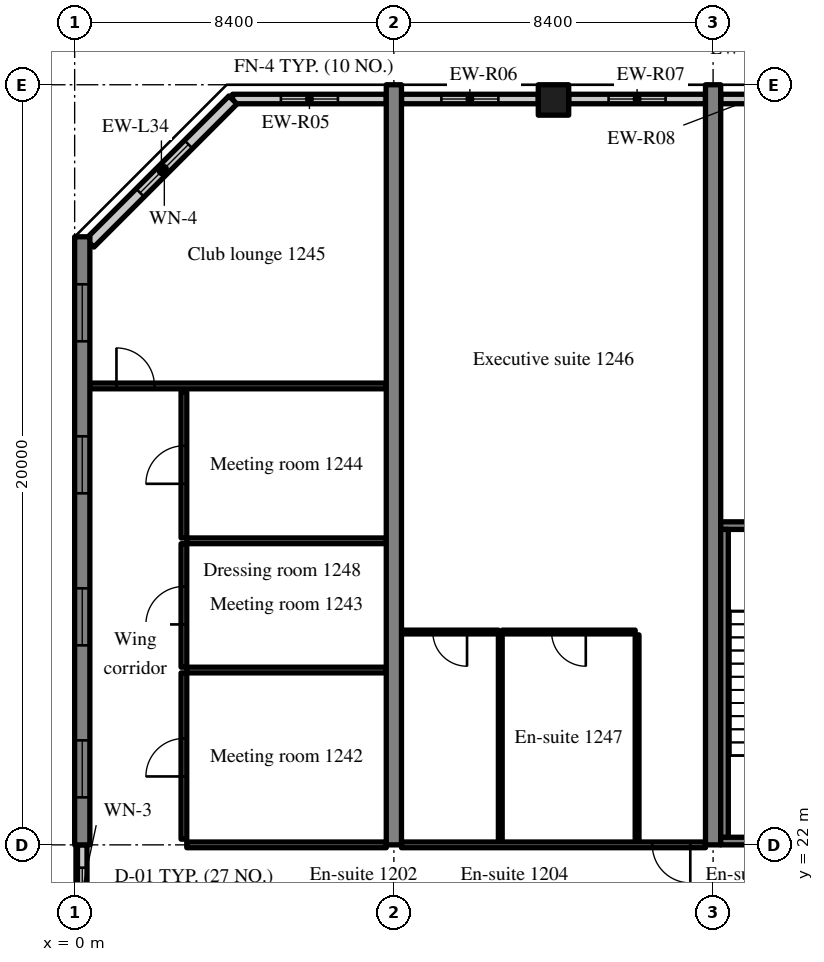
"""IFC4 building model, lengths in metres.
Left out: names, types, materials, properties, quantities, classifications, styles, units other than length and angle.
Written with IfcOpenShell. Run it as: python <this file> out.ifc"""

import sys

from ifc_helpers import new_model, si_unit, direction, frame, frame_2d, origin, origin_2d, place, context, subcontext, project, spatial, rectangle, extrude, source, transform, mapped, element, fill, save


model = new_model("IFC4")
c1 = context("Model", 3, precision=1e-05, world=origin(), true_north=direction((0.0, 1.0)))
c2 = subcontext(c1, "Body", "Model", "MODEL_VIEW")
j1 = project(units=[si_unit("LENGTHUNIT", "METRE"), si_unit("PLANEANGLEUNIT", "RADIAN")], contexts=[c1])
p1 = place(None, origin())
s1 = spatial("IfcSite", under=j1, at=p1, CompositionType="ELEMENT")
p2 = place(p1, origin())
s2 = spatial("IfcBuilding", under=s1, at=p2, CompositionType="ELEMENT")
p3 = place(p2, frame((0.0, 0.0, 54.4)))
s3 = spatial("IfcBuildingStorey", under=s2, at=p3, CompositionType="ELEMENT", Elevation=54.4)
m1 = source(origin(), c2, "Body", "SweptSolid", [
    extrude(rectangle(XDim=16.0, YDim=0.4, at=frame_2d((8.0, 0.0))), origin(), (0.0, 0.0, 1.0), 3.52),
])
p4 = place(p3, frame((0.2, 22.0, 0.0), z_axis=(0.0, 0.0, 1.0), x_axis=(0.0, 1.0, 0.0)))
e1 = element("IfcWall", 1, at=p4, inside=s3, PredefinedType="SHEAR", context=c2, shape_type="MappedRepresentation", body=[
    mapped(m1, transform((0.0, 0.0, 0.0), scale=1.0)),
])
m2 = source(origin(), c2, "Body", "SweptSolid", [
    extrude(rectangle(XDim=1.5, YDim=1.5, at=frame_2d((0.75, 0.75))), frame((0.0, 0.21, 0.0), z_axis=(0.0, -1.0, 0.0), x_axis=(1.0, 0.0, 0.0)), (0.0, 0.0, 1.0), 0.42),
])
p5 = place(p4, frame((1.25, 0.0, 0.9)))
e2 = element("IfcOpeningElement", 2, at=p5, cuts=e1, PredefinedType="OPENING", context=c2, shape_type="MappedRepresentation", body=[
    mapped(m2, transform((0.0, 0.0, 0.0), scale=1.0)),
])
p6 = place(p4, frame((5.25, 0.0, 0.9)))
e3 = element("IfcOpeningElement", 3, at=p6, cuts=e1, PredefinedType="OPENING", context=c2, shape_type="MappedRepresentation", body=[
    mapped(m2, transform((0.0, 0.0, 0.0), scale=1.0)),
])
p7 = place(p4, frame((9.25, 0.0, 0.9)))
e4 = element("IfcOpeningElement", 4, at=p7, cuts=e1, PredefinedType="OPENING", context=c2, shape_type="MappedRepresentation", body=[
    mapped(m2, transform((0.0, 0.0, 0.0), scale=1.0)),
])
p8 = place(p4, frame((13.25, 0.0, 0.9)))
e5 = element("IfcOpeningElement", 5, at=p8, cuts=e1, PredefinedType="OPENING", context=c2, shape_type="MappedRepresentation", body=[
    mapped(m2, transform((0.0, 0.0, 0.0), scale=1.0)),
])
m3 = source(origin(), c2, "Body", "SweptSolid", [
    extrude(rectangle(XDim=20.0, YDim=0.4, at=frame_2d((10.0, 0.0))), origin(), (0.0, 0.0, 1.0), 3.52),
])
for number, where, z_axis, x_axis in (
    (6, (8.4, 22.0, 0.0), (0.0, 0.0, 1.0), (0.0, 1.0, 0.0)),
    (7, (16.8, 22.0, 0.0), (0.0, 0.0, 1.0), (0.0, 1.0, 0.0)),
):
    element("IfcWall", number, at=place(p3, frame(where, z_axis=z_axis, x_axis=x_axis)), inside=s3, PredefinedType="SHEAR", context=c2, shape_type="MappedRepresentation", body=[
        mapped(m3, transform((0.0, 0.0, 0.0), scale=1.0)),
    ])
m4 = source(origin(), c2, "Body", "SweptSolid", [
    extrude(rectangle(XDim=0.8, YDim=0.8, at=origin_2d()), origin(), (0.0, 0.0, 1.0), 3.52),
])
p9 = place(p3, frame((12.6, 41.6, 0.0), z_axis=(0.0, 0.0, 1.0), x_axis=(1.0, 0.0, 0.0)))
e8 = element("IfcColumn", 8, at=p9, inside=s3, PredefinedType="COLUMN", context=c2, shape_type="MappedRepresentation", body=[
    mapped(m4, transform((0.0, 0.0, 0.0), scale=1.0)),
])
m5 = source(origin(), c2, "Body", "SweptSolid", [
    extrude(rectangle(XDim=4.045, YDim=0.25, at=frame_2d((2.022, 0.0))), origin(), (0.0, 0.0, 1.0), 2.82),
])
p10 = place(p3, frame((8.2, 41.625, 0.0), z_axis=(0.0, 0.0, 1.0), x_axis=(-1.0, 0.0, 0.0)))
e9 = element("IfcWall", 9, at=p10, inside=s3, PredefinedType="SOLIDWALL", context=c2, shape_type="MappedRepresentation", body=[
    mapped(m5, transform((0.0, 0.0, 0.0), scale=1.0)),
])
m6 = source(origin(), c2, "Body", "SweptSolid", [
    extrude(rectangle(XDim=1.5, YDim=1.5, at=frame_2d((0.75, 0.75))), frame((0.0, 0.135, 0.0), z_axis=(0.0, -1.0, 0.0), x_axis=(1.0, 0.0, 0.0)), (0.0, 0.0, 1.0), 0.27),
])
p11 = place(p10, frame((1.272, 0.0, 0.9)))
e10 = element("IfcOpeningElement", 10, at=p11, cuts=e9, PredefinedType="OPENING", context=c2, shape_type="MappedRepresentation", body=[
    mapped(m6, transform((0.0, 0.0, 0.0), scale=1.0)),
])
m7 = source(origin(), c2, "Body", "SweptSolid", [
    extrude(rectangle(XDim=3.6, YDim=0.25, at=frame_2d((1.8, 0.0))), origin(), (0.0, 0.0, 1.0), 2.82),
])
p12 = place(p3, frame((12.2, 41.625, 0.0), z_axis=(0.0, 0.0, 1.0), x_axis=(-1.0, 0.0, 0.0)))
e11 = element("IfcWall", 11, at=p12, inside=s3, PredefinedType="SOLIDWALL", context=c2, shape_type="MappedRepresentation", body=[
    mapped(m7, transform((0.0, 0.0, 0.0), scale=1.0)),
])
p13 = place(p12, frame((1.05, 0.0, 0.9)))
e12 = element("IfcOpeningElement", 12, at=p13, cuts=e11, PredefinedType="OPENING", context=c2, shape_type="MappedRepresentation", body=[
    mapped(m6, transform((0.0, 0.0, 0.0), scale=1.0)),
])
m8 = source(origin(), c2, "Body", "SweptSolid", [
    extrude(rectangle(XDim=3.6, YDim=0.25, at=frame_2d((1.8, 0.0))), origin(), (0.0, 0.0, 1.0), 2.82),
])
p14 = place(p3, frame((16.6, 41.625, 0.0), z_axis=(0.0, 0.0, 1.0), x_axis=(-1.0, 0.0, 0.0)))
e13 = element("IfcWall", 13, at=p14, inside=s3, PredefinedType="SOLIDWALL", context=c2, shape_type="MappedRepresentation", body=[
    mapped(m8, transform((0.0, 0.0, 0.0), scale=1.0)),
])
p15 = place(p14, frame((1.05, 0.0, 0.9)))
e14 = element("IfcOpeningElement", 14, at=p15, cuts=e13, PredefinedType="OPENING", context=c2, shape_type="MappedRepresentation", body=[
    mapped(m6, transform((0.0, 0.0, 0.0), scale=1.0)),
])
m9 = source(origin(), c2, "Body", "SweptSolid", [
    extrude(rectangle(XDim=1.658, YDim=0.25, at=frame_2d((0.829, 0.0))), origin(), (0.0, 0.0, 1.0), 2.82),
])
p16 = place(p3, frame((18.658, 41.625, 0.0), z_axis=(0.0, 0.0, 1.0), x_axis=(-1.0, 0.0, 0.0)))
e15 = element("IfcWall", 15, at=p16, inside=s3, PredefinedType="SOLIDWALL", context=c2, shape_type="MappedRepresentation", body=[
    mapped(m9, transform((0.0, 0.0, 0.0), scale=1.0)),
])
m10 = source(origin(), c2, "Body", "SweptSolid", [
    extrude(rectangle(XDim=5.326, YDim=0.3, at=frame_2d((2.663, 0.0))), origin(), (0.0, 0.0, 1.0), 3.52),
])
p17 = place(p3, frame((4.166, 41.6, 0.0), z_axis=(0.0, 0.0, 1.0), x_axis=(-0.707106781187, -0.707106781187, 0.0)))
e16 = element("IfcWall", 16, at=p17, inside=s3, PredefinedType="SOLIDWALL", context=c2, shape_type="MappedRepresentation", body=[
    mapped(m10, transform((0.0, 0.0, 0.0), scale=1.0)),
])
m11 = source(origin(), c2, "Body", "SweptSolid", [
    extrude(rectangle(XDim=1.8, YDim=1.5, at=frame_2d((0.9, 0.75))), frame((0.0, 0.16, 0.0), z_axis=(0.0, -1.0, 0.0), x_axis=(1.0, 0.0, 0.0)), (0.0, 0.0, 1.0), 0.32),
])
p18 = place(p17, frame((1.654, 0.0, 0.9)))
e17 = element("IfcOpeningElement", 17, at=p18, cuts=e16, PredefinedType="OPENING", context=c2, shape_type="MappedRepresentation", body=[
    mapped(m11, transform((0.0, 0.0, 0.0), scale=1.0)),
])
m12 = source(origin(), c2, "Body", "SweptSolid", [
    extrude(rectangle(XDim=2.4, YDim=0.25, at=frame_2d((1.2, 0.0))), origin(), (0.0, 0.0, 1.0), 2.62),
])
p19 = place(p3, frame((0.2, 19.6, 0.0), z_axis=(0.0, 0.0, 1.0), x_axis=(0.0, 1.0, 0.0)))
e18 = element("IfcWall", 18, at=p19, inside=s3, PredefinedType="SOLIDWALL", context=c2, shape_type="MappedRepresentation", body=[
    mapped(m12, transform((0.0, 0.0, 0.0), scale=1.0)),
])
m13 = source(origin(), c2, "Body", "SweptSolid", [
    extrude(rectangle(XDim=1.2, YDim=1.5, at=frame_2d((0.6, 0.75))), frame((0.0, 0.135, 0.0), z_axis=(0.0, -1.0, 0.0), x_axis=(1.0, 0.0, 0.0)), (0.0, 0.0, 1.0), 0.27),
])
p20 = place(p19, frame((0.6, 0.0, 0.9)))
e19 = element("IfcOpeningElement", 19, at=p20, cuts=e18, PredefinedType="OPENING", context=c2, shape_type="MappedRepresentation", body=[
    mapped(m13, transform((0.0, 0.0, 0.0), scale=1.0)),
])
m14 = source(origin(), c2, "Body", "SweptSolid", [
    extrude(rectangle(XDim=8.2, YDim=0.2, at=frame_2d((4.1, 0.0))), origin(), (0.0, 0.0, 1.0), 3.52),
])
p21 = place(p3, frame((17.0, 22.1, 0.0), z_axis=(0.0, 0.0, 1.0), x_axis=(1.0, 0.0, 0.0)))
e20 = element("IfcWall", 20, at=p21, inside=s3, PredefinedType="SOLIDWALL", context=c2, shape_type="MappedRepresentation", body=[
    mapped(m14, transform((0.0, 0.0, 0.0), scale=1.0)),
])
m15 = source(origin(), c2, "Body", "SweptSolid", [
    extrude(rectangle(XDim=1.2, YDim=2.1, at=frame_2d((0.6, 1.05))), frame((0.0, 0.11, 0.0), z_axis=(0.0, -1.0, 0.0), x_axis=(1.0, 0.0, 0.0)), (0.0, 0.0, 1.0), 0.22),
])
p22 = place(p21, frame((6.0, 0.0, 0.0)))
e21 = element("IfcOpeningElement", 21, at=p22, cuts=e20, PredefinedType="OPENING", context=c2, shape_type="MappedRepresentation", body=[
    mapped(m15, transform((0.0, 0.0, 0.0), scale=1.0)),
])
p23 = place(p3, frame((17.0, 30.4, 0.0), z_axis=(0.0, 0.0, 1.0), x_axis=(1.0, 0.0, 0.0)))
e22 = element("IfcWall", 22, at=p23, inside=s3, PredefinedType="SOLIDWALL", context=c2, shape_type="MappedRepresentation", body=[
    mapped(m14, transform((0.0, 0.0, 0.0), scale=1.0)),
])
m16 = source(origin(), c2, "Body", "SweptSolid", [
    extrude(rectangle(XDim=1.0, YDim=2.1, at=frame_2d((0.5, 1.05))), frame((0.0, 0.11, 0.0), z_axis=(0.0, -1.0, 0.0), x_axis=(1.0, 0.0, 0.0)), (0.0, 0.0, 1.0), 0.22),
])
p24 = place(p23, frame((6.1, 0.0, 0.0)))
e23 = element("IfcOpeningElement", 23, at=p24, cuts=e22, PredefinedType="OPENING", context=c2, shape_type="MappedRepresentation", body=[
    mapped(m16, transform((0.0, 0.0, 0.0), scale=1.0)),
])
m17 = source(origin(), c2, "Body", "SweptSolid", [
    extrude(rectangle(XDim=8.1, YDim=0.2, at=frame_2d((4.05, 0.0))), origin(), (0.0, 0.0, 1.0), 3.52),
])
p25 = place(p3, frame((17.1, 22.2, 0.0), z_axis=(0.0, 0.0, 1.0), x_axis=(0.0, 1.0, 0.0)))
e24 = element("IfcWall", 24, at=p25, inside=s3, PredefinedType="SOLIDWALL", context=c2, shape_type="MappedRepresentation", body=[
    mapped(m17, transform((0.0, 0.0, 0.0), scale=1.0)),
])
m18 = source(origin(), c2, "Body", "SweptSolid", [
    extrude(rectangle(XDim=5.25, YDim=0.15, at=frame_2d((2.625, 0.0))), origin(), (0.0, 0.0, 1.0), 2.82),
])
p26 = place(p3, frame((2.95, 22.0, 0.0), z_axis=(0.0, 0.0, 1.0), x_axis=(1.0, 0.0, 0.0)))
e25 = element("IfcWall", 25, at=p26, inside=s3, PredefinedType="PARTITIONING", context=c2, shape_type="MappedRepresentation", body=[
    mapped(m18, transform((0.0, 0.0, 0.0), scale=1.0)),
])
m19 = source(origin(), c2, "Body", "SweptSolid", [
    extrude(rectangle(XDim=4.375, YDim=0.15, at=frame_2d((2.188, 0.0))), origin(), (0.0, 0.0, 1.0), 3.52),
])
p27 = place(p3, frame((2.875, 22.15, 0.0), z_axis=(0.0, 0.0, 1.0), x_axis=(0.0, 1.0, 0.0)))
e26 = element("IfcWall", 26, at=p27, inside=s3, PredefinedType="PARTITIONING", context=c2, shape_type="MappedRepresentation", body=[
    mapped(m19, transform((0.0, 0.0, 0.0), scale=1.0)),
])
m20 = source(origin(), c2, "Body", "SweptSolid", [
    extrude(rectangle(XDim=1.0, YDim=2.1, at=frame_2d((0.5, 1.05))), frame((0.0, 0.085, 0.0), z_axis=(0.0, -1.0, 0.0), x_axis=(1.0, 0.0, 0.0)), (0.0, 0.0, 1.0), 0.17),
])
p28 = place(p27, frame((1.65, 0.0, 0.0)))
e27 = element("IfcOpeningElement", 27, at=p28, cuts=e26, PredefinedType="OPENING", context=c2, shape_type="MappedRepresentation", body=[
    mapped(m20, transform((0.0, 0.0, 0.0), scale=1.0)),
])
m21 = source(origin(), c2, "Body", "SweptSolid", [
    extrude(rectangle(XDim=5.25, YDim=0.15, at=frame_2d((2.625, 0.0))), origin(), (0.0, 0.0, 1.0), 3.52),
])
p29 = place(p3, frame((2.95, 26.6, 0.0), z_axis=(0.0, 0.0, 1.0), x_axis=(1.0, 0.0, 0.0)))
e28 = element("IfcWall", 28, at=p29, inside=s3, PredefinedType="PARTITIONING", context=c2, shape_type="MappedRepresentation", body=[
    mapped(m21, transform((0.0, 0.0, 0.0), scale=1.0)),
])
m22 = source(origin(), c2, "Body", "SweptSolid", [
    extrude(rectangle(XDim=3.25, YDim=0.15, at=frame_2d((1.625, 0.0))), origin(), (0.0, 0.0, 1.0), 3.52),
])
p30 = place(p3, frame((2.875, 26.675, 0.0), z_axis=(0.0, 0.0, 1.0), x_axis=(0.0, 1.0, 0.0)))
e29 = element("IfcWall", 29, at=p30, inside=s3, PredefinedType="PARTITIONING", context=c2, shape_type="MappedRepresentation", body=[
    mapped(m22, transform((0.0, 0.0, 0.0), scale=1.0)),
])
p31 = place(p30, frame((1.125, 0.0, 0.0)))
e30 = element("IfcOpeningElement", 30, at=p31, cuts=e29, PredefinedType="OPENING", context=c2, shape_type="MappedRepresentation", body=[
    mapped(m20, transform((0.0, 0.0, 0.0), scale=1.0)),
])
p32 = place(p3, frame((2.95, 30.0, 0.0), z_axis=(0.0, 0.0, 1.0), x_axis=(1.0, 0.0, 0.0)))
e31 = element("IfcWall", 31, at=p32, inside=s3, PredefinedType="PARTITIONING", context=c2, shape_type="MappedRepresentation", body=[
    mapped(m21, transform((0.0, 0.0, 0.0), scale=1.0)),
])
m23 = source(origin(), c2, "Body", "SweptSolid", [
    extrude(rectangle(XDim=3.85, YDim=0.15, at=frame_2d((1.925, 0.0))), origin(), (0.0, 0.0, 1.0), 3.52),
])
p33 = place(p3, frame((2.875, 30.075, 0.0), z_axis=(0.0, 0.0, 1.0), x_axis=(0.0, 1.0, 0.0)))
e32 = element("IfcWall", 32, at=p33, inside=s3, PredefinedType="PARTITIONING", context=c2, shape_type="MappedRepresentation", body=[
    mapped(m23, transform((0.0, 0.0, 0.0), scale=1.0)),
])
p34 = place(p33, frame((1.425, 0.0, 0.0)))
e33 = element("IfcOpeningElement", 33, at=p34, cuts=e32, PredefinedType="OPENING", context=c2, shape_type="MappedRepresentation", body=[
    mapped(m20, transform((0.0, 0.0, 0.0), scale=1.0)),
])
m24 = source(origin(), c2, "Body", "SweptSolid", [
    extrude(rectangle(XDim=7.8, YDim=0.15, at=frame_2d((3.9, 0.0))), origin(), (0.0, 0.0, 1.0), 3.52),
])
p35 = place(p3, frame((0.4, 34.075, 0.0), z_axis=(0.0, 0.0, 1.0), x_axis=(1.0, 0.0, 0.0)))
e34 = element("IfcWall", 34, at=p35, inside=s3, PredefinedType="PARTITIONING", context=c2, shape_type="MappedRepresentation", body=[
    mapped(m24, transform((0.0, 0.0, 0.0), scale=1.0)),
])
p36 = place(p35, frame((0.7, 0.0, 0.0)))
e35 = element("IfcOpeningElement", 35, at=p36, cuts=e34, PredefinedType="OPENING", context=c2, shape_type="MappedRepresentation", body=[
    mapped(m20, transform((0.0, 0.0, 0.0), scale=1.0)),
])
m25 = source(origin(), c2, "Body", "SweptSolid", [
    extrude(rectangle(XDim=5.45, YDim=0.1, at=frame_2d((2.725, 0.0))), origin(), (0.0, 0.0, 1.0), 3.52),
])
for number, where, z_axis, x_axis in (
    (36, (14.8, 22.075, 0.0), (0.0, 0.0, 1.0), (0.0, 1.0, 0.0)),
    (37, (11.2, 22.075, 0.0), (0.0, 0.0, 1.0), (0.0, 1.0, 0.0)),
):
    element("IfcWall", number, at=place(p3, frame(where, z_axis=z_axis, x_axis=x_axis)), inside=s3, PredefinedType="PARTITIONING", context=c2, shape_type="MappedRepresentation", body=[
        mapped(m25, transform((0.0, 0.0, 0.0), scale=1.0)),
    ])
m26 = source(origin(), c2, "Body", "SweptSolid", [
    extrude(rectangle(XDim=3.5, YDim=0.1, at=frame_2d((1.75, 0.0))), origin(), (0.0, 0.0, 1.0), 3.52),
])
p37 = place(p3, frame((11.25, 27.6, 0.0), z_axis=(0.0, 0.0, 1.0), x_axis=(1.0, 0.0, 0.0)))
e38 = element("IfcWall", 38, at=p37, inside=s3, PredefinedType="PARTITIONING", context=c2, shape_type="MappedRepresentation", body=[
    mapped(m26, transform((0.0, 0.0, 0.0), scale=1.0)),
])
m27 = source(origin(), c2, "Body", "SweptSolid", [
    extrude(rectangle(XDim=0.9, YDim=2.1, at=frame_2d((0.45, 1.05))), frame((0.0, 0.06, 0.0), z_axis=(0.0, -1.0, 0.0), x_axis=(1.0, 0.0, 0.0)), (0.0, 0.0, 1.0), 0.12),
])
p38 = place(p37, frame((1.3, 0.0, 0.0)))
e39 = element("IfcOpeningElement", 39, at=p38, cuts=e38, PredefinedType="OPENING", context=c2, shape_type="MappedRepresentation", body=[
    mapped(m27, transform((0.0, 0.0, 0.0), scale=1.0)),
])
m28 = source(origin(), c2, "Body", "SweptSolid", [
    extrude(rectangle(XDim=2.55, YDim=0.1, at=frame_2d((1.275, 0.0))), origin(), (0.0, 0.0, 1.0), 3.52),
])
p39 = place(p3, frame((8.6, 27.6, 0.0), z_axis=(0.0, 0.0, 1.0), x_axis=(1.0, 0.0, 0.0)))
e40 = element("IfcWall", 40, at=p39, inside=s3, PredefinedType="PARTITIONING", context=c2, shape_type="MappedRepresentation", body=[
    mapped(m28, transform((0.0, 0.0, 0.0), scale=1.0)),
])
p40 = place(p39, frame((0.825, 0.0, 0.0)))
e41 = element("IfcOpeningElement", 41, at=p40, cuts=e40, PredefinedType="OPENING", context=c2, shape_type="MappedRepresentation", body=[
    mapped(m27, transform((0.0, 0.0, 0.0), scale=1.0)),
])
m29 = source(origin(), c2, "Body", "SweptSolid", [
    extrude(rectangle(XDim=8.0, YDim=0.15, at=frame_2d((4.0, 0.0))), origin(), (0.0, 0.0, 1.0), 2.82),
])
p41 = place(p3, frame((8.6, 22.0, 0.0), z_axis=(0.0, 0.0, 1.0), x_axis=(1.0, 0.0, 0.0)))
e42 = element("IfcWall", 42, at=p41, inside=s3, PredefinedType="PARTITIONING", context=c2, shape_type="MappedRepresentation", body=[
    mapped(m29, transform((0.0, 0.0, 0.0), scale=1.0)),
])
p42 = place(p41, frame((6.6, 0.0, 0.0)))
e43 = element("IfcOpeningElement", 43, at=p42, cuts=e42, PredefinedType="OPENING", context=c2, shape_type="MappedRepresentation", body=[
    mapped(m20, transform((0.0, 0.0, 0.0), scale=1.0)),
])
m30 = source(origin(), c2, "Body", "SweptSolid", [
    extrude(rectangle(XDim=1.5, YDim=1.5, at=frame_2d((0.75, 0.75))), frame((0.0, 0.03, 0.0), z_axis=(0.0, -1.0, 0.0), x_axis=(1.0, 0.0, 0.0)), (0.0, 0.0, 1.0), 0.06),
])
p43 = place(p11, origin())
e44 = element("IfcWindow", 44, at=p43, inside=s3, PartitioningType="SINGLE_PANEL", PredefinedType="WINDOW", context=c2, shape_type="MappedRepresentation", body=[
    mapped(m30, transform((0.0, 0.0, 0.0), scale=1.0)),
])
fill(e10, e44)
p44 = place(p13, origin())
e45 = element("IfcWindow", 45, at=p44, inside=s3, PartitioningType="SINGLE_PANEL", PredefinedType="WINDOW", context=c2, shape_type="MappedRepresentation", body=[
    mapped(m30, transform((0.0, 0.0, 0.0), scale=1.0)),
])
fill(e12, e45)
p45 = place(p15, origin())
e46 = element("IfcWindow", 46, at=p45, inside=s3, PartitioningType="SINGLE_PANEL", PredefinedType="WINDOW", context=c2, shape_type="MappedRepresentation", body=[
    mapped(m30, transform((0.0, 0.0, 0.0), scale=1.0)),
])
fill(e14, e46)
m31 = source(origin(), c2, "Body", "SweptSolid", [
    extrude(rectangle(XDim=1.8, YDim=1.5, at=frame_2d((0.9, 0.75))), frame((0.0, 0.03, 0.0), z_axis=(0.0, -1.0, 0.0), x_axis=(1.0, 0.0, 0.0)), (0.0, 0.0, 1.0), 0.06),
])
p46 = place(p18, origin())
e47 = element("IfcWindow", 47, at=p46, inside=s3, PartitioningType="SINGLE_PANEL", PredefinedType="WINDOW", context=c2, shape_type="MappedRepresentation", body=[
    mapped(m31, transform((0.0, 0.0, 0.0), scale=1.0)),
])
fill(e17, e47)
p47 = place(p5, origin())
e48 = element("IfcWindow", 48, at=p47, inside=s3, PartitioningType="SINGLE_PANEL", PredefinedType="WINDOW", context=c2, shape_type="MappedRepresentation", body=[
    mapped(m30, transform((0.0, 0.0, 0.0), scale=1.0)),
])
fill(e2, e48)
p48 = place(p6, origin())
e49 = element("IfcWindow", 49, at=p48, inside=s3, PartitioningType="SINGLE_PANEL", PredefinedType="WINDOW", context=c2, shape_type="MappedRepresentation", body=[
    mapped(m30, transform((0.0, 0.0, 0.0), scale=1.0)),
])
fill(e3, e49)
p49 = place(p7, origin())
e50 = element("IfcWindow", 50, at=p49, inside=s3, PartitioningType="SINGLE_PANEL", PredefinedType="WINDOW", context=c2, shape_type="MappedRepresentation", body=[
    mapped(m30, transform((0.0, 0.0, 0.0), scale=1.0)),
])
fill(e4, e50)
p50 = place(p8, origin())
e51 = element("IfcWindow", 51, at=p50, inside=s3, PartitioningType="SINGLE_PANEL", PredefinedType="WINDOW", context=c2, shape_type="MappedRepresentation", body=[
    mapped(m30, transform((0.0, 0.0, 0.0), scale=1.0)),
])
fill(e5, e51)
m32 = source(origin(), c2, "Body", "SweptSolid", [
    extrude(rectangle(XDim=1.2, YDim=1.5, at=frame_2d((0.6, 0.75))), frame((0.0, 0.03, 0.0), z_axis=(0.0, -1.0, 0.0), x_axis=(1.0, 0.0, 0.0)), (0.0, 0.0, 1.0), 0.06),
])
p51 = place(p20, origin())
e52 = element("IfcWindow", 52, at=p51, inside=s3, PartitioningType="SINGLE_PANEL", PredefinedType="WINDOW", context=c2, shape_type="MappedRepresentation", body=[
    mapped(m32, transform((0.0, 0.0, 0.0), scale=1.0)),
])
fill(e19, e52)
m33 = source(origin(), c2, "Body", "SweptSolid", [
    extrude(rectangle(XDim=1.0, YDim=2.1, at=frame_2d((0.5, 1.05))), frame((0.0, 0.025, 0.0), z_axis=(0.0, -1.0, 0.0), x_axis=(1.0, 0.0, 0.0)), (0.0, 0.0, 1.0), 0.05),
])
p52 = place(p28, origin())
e53 = element("IfcDoor", 53, at=p52, inside=s3, OperationType="SINGLE_SWING_LEFT", PredefinedType="DOOR", context=c2, shape_type="MappedRepresentation", body=[
    mapped(m33, transform((0.0, 0.0, 0.0), scale=1.0)),
])
fill(e27, e53)
p53 = place(p31, origin())
e54 = element("IfcDoor", 54, at=p53, inside=s3, OperationType="SINGLE_SWING_LEFT", PredefinedType="DOOR", context=c2, shape_type="MappedRepresentation", body=[
    mapped(m33, transform((0.0, 0.0, 0.0), scale=1.0)),
])
fill(e30, e54)
p54 = place(p34, origin())
e55 = element("IfcDoor", 55, at=p54, inside=s3, OperationType="SINGLE_SWING_LEFT", PredefinedType="DOOR", context=c2, shape_type="MappedRepresentation", body=[
    mapped(m33, transform((0.0, 0.0, 0.0), scale=1.0)),
])
fill(e33, e55)
p55 = place(p36, origin())
e56 = element("IfcDoor", 56, at=p55, inside=s3, OperationType="SINGLE_SWING_LEFT", PredefinedType="DOOR", context=c2, shape_type="MappedRepresentation", body=[
    mapped(m33, transform((0.0, 0.0, 0.0), scale=1.0)),
])
fill(e35, e56)
m34 = source(origin(), c2, "Body", "SweptSolid", [
    extrude(rectangle(XDim=0.9, YDim=2.1, at=frame_2d((0.45, 1.05))), frame((0.0, 0.025, 0.0), z_axis=(0.0, -1.0, 0.0), x_axis=(1.0, 0.0, 0.0)), (0.0, 0.0, 1.0), 0.05),
])
p56 = place(p38, origin())
e57 = element("IfcDoor", 57, at=p56, inside=s3, OperationType="SINGLE_SWING_RIGHT", PredefinedType="DOOR", context=c2, shape_type="MappedRepresentation", body=[
    mapped(m34, transform((0.0, 0.0, 0.0), scale=1.0)),
])
fill(e39, e57)
p57 = place(p40, origin())
e58 = element("IfcDoor", 58, at=p57, inside=s3, OperationType="SINGLE_SWING_RIGHT", PredefinedType="DOOR", context=c2, shape_type="MappedRepresentation", body=[
    mapped(m34, transform((0.0, 0.0, 0.0), scale=1.0)),
])
fill(e41, e58)
p58 = place(p42, origin())
e59 = element("IfcDoor", 59, at=p58, inside=s3, OperationType="SINGLE_SWING_RIGHT", PredefinedType="DOOR", context=c2, shape_type="MappedRepresentation", body=[
    mapped(m33, transform((0.0, 0.0, 0.0), scale=1.0)),
])
fill(e43, e59)
save(model, sys.argv[1])
